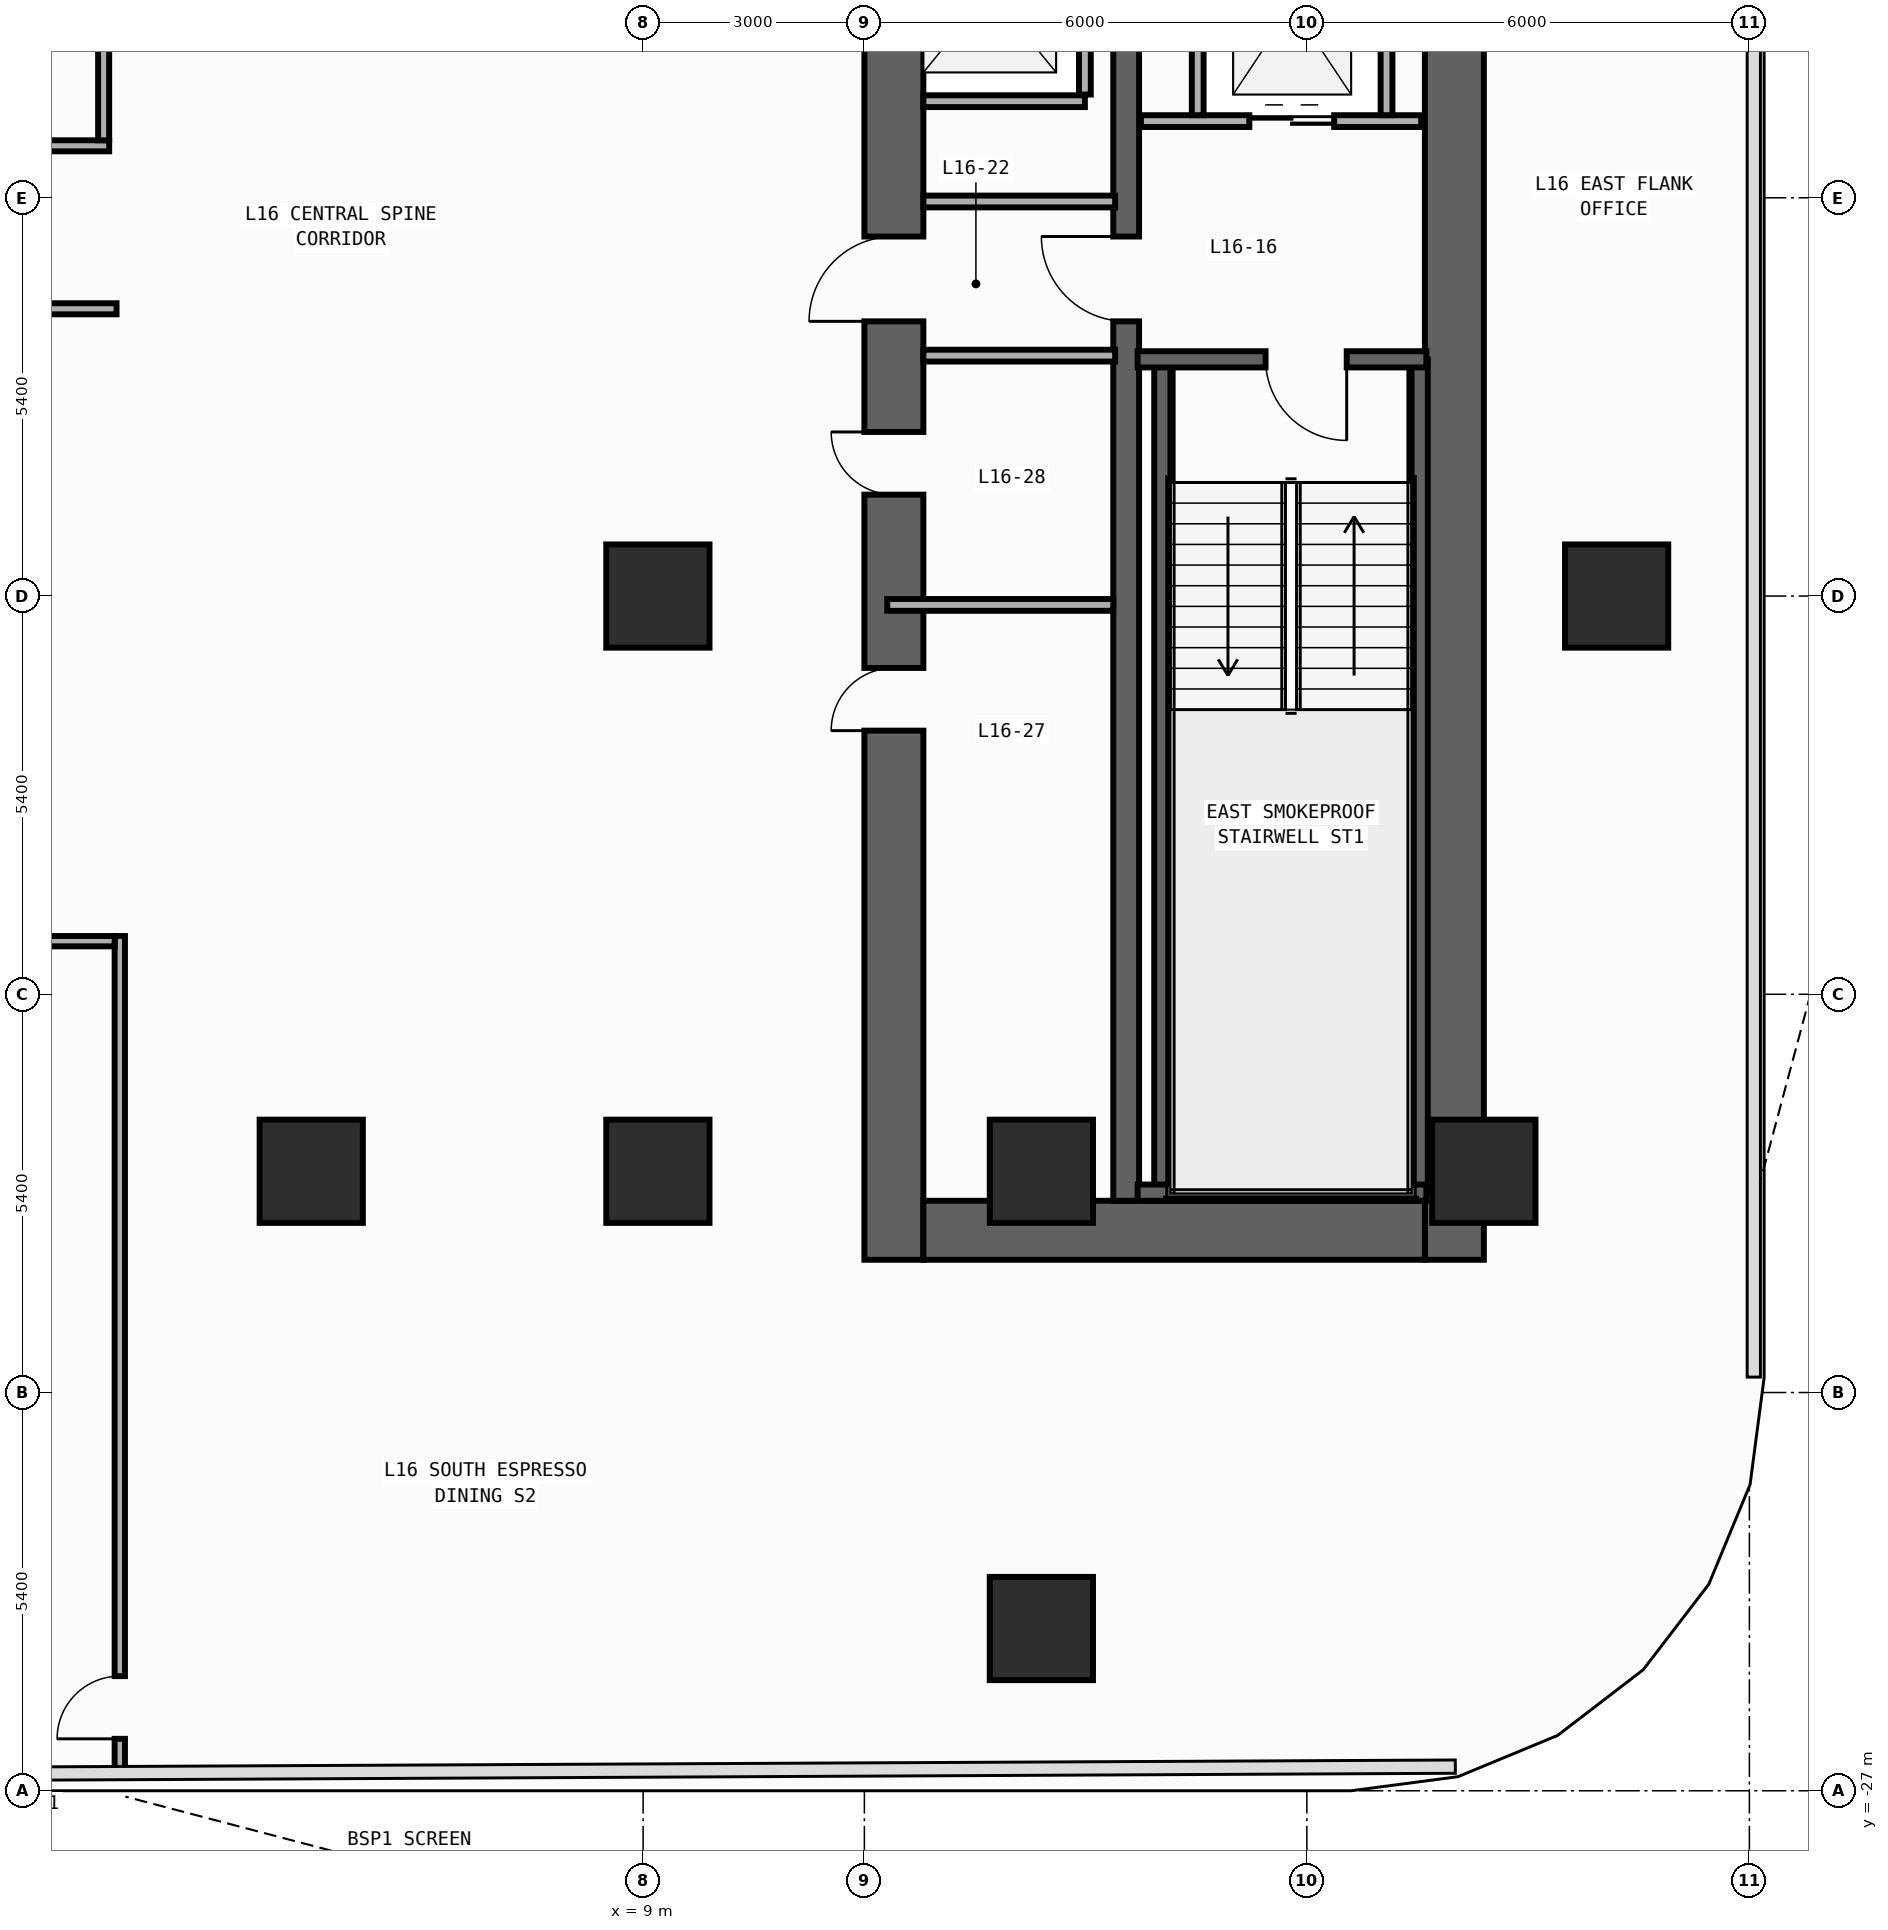
"""IFC4 building model, lengths in metres.
Left out: names, types, materials, properties, quantities, classifications, styles, units other than length and angle.
Written with IfcOpenShell. Run it as: python <this file> out.ifc"""

import sys

from ifc_helpers import new_model, si_unit, direction, frame, frame_2d, origin, origin_2d, place, context, subcontext, project, spatial, rectangle, extrude, element, fill, save


model = new_model("IFC4")
c1 = context("Model", 3, precision=1e-05, world=origin(), true_north=direction((0.0, 1.0)))
c2 = subcontext(c1, "Body", "Model", "MODEL_VIEW")
j1 = project(units=[si_unit("LENGTHUNIT", "METRE"), si_unit("PLANEANGLEUNIT", "RADIAN")], contexts=[c1])
p1 = place(None, origin())
s1 = spatial("IfcSite", under=j1, at=p1, CompositionType="ELEMENT")
p2 = place(p1, origin())
s2 = spatial("IfcBuilding", under=s1, at=p2, CompositionType="ELEMENT")
p3 = place(p2, frame((0.0, 0.0, 68.0)))
s3 = spatial("IfcBuildingStorey", under=s2, at=p3, CompositionType="ELEMENT", Elevation=68.0)
p4 = place(p3, frame((12.4, -19.8, 0.0), z_axis=(0.0, 0.0, 1.0), x_axis=(0.0, 1.0, 0.0)))
e1 = element("IfcWall", 1, at=p4, inside=s3, PredefinedType="SHEAR", context=c2, shape_type="SweptSolid", body=[
    extrude(rectangle(XDim=27.0, YDim=0.8, at=frame_2d((13.5, 0.0))), origin(), (0.0, 0.0, 1.0), 3.94),
])
p5 = place(p4, frame((23.05, 0.0, 0.0)))
e2 = element("IfcOpeningElement", 2, at=p5, cuts=e1, PredefinedType="OPENING", context=c2, shape_type="SweptSolid", body=[
    extrude(rectangle(XDim=1.1, YDim=2.2, at=frame_2d((0.55, 1.1))), frame((0.0, 0.41, 0.0), z_axis=(0.0, -1.0, 0.0), x_axis=(1.0, 0.0, 0.0)), (0.0, 0.0, 1.0), 0.82),
])
p6 = place(p4, frame((19.85, 0.0, 0.0)))
e3 = element("IfcOpeningElement", 3, at=p6, cuts=e1, PredefinedType="OPENING", context=c2, shape_type="SweptSolid", body=[
    extrude(rectangle(XDim=1.1, YDim=2.2, at=frame_2d((0.55, 1.1))), frame((0.0, 0.41, 0.0), z_axis=(0.0, -1.0, 0.0), x_axis=(1.0, 0.0, 0.0)), (0.0, 0.0, 1.0), 0.82),
])
p7 = place(p4, frame((16.65, 0.0, 0.0)))
e4 = element("IfcOpeningElement", 4, at=p7, cuts=e1, PredefinedType="OPENING", context=c2, shape_type="SweptSolid", body=[
    extrude(rectangle(XDim=1.1, YDim=2.2, at=frame_2d((0.55, 1.1))), frame((0.0, 0.41, 0.0), z_axis=(0.0, -1.0, 0.0), x_axis=(1.0, 0.0, 0.0)), (0.0, 0.0, 1.0), 0.82),
])
p8 = place(p4, frame((7.175, 0.0, 0.0)))
e5 = element("IfcOpeningElement", 5, at=p8, cuts=e1, PredefinedType="OPENING", context=c2, shape_type="SweptSolid", body=[
    extrude(rectangle(XDim=0.85, YDim=2.1, at=frame_2d((0.425, 1.05))), frame((0.0, 0.41, 0.0), z_axis=(0.0, -1.0, 0.0), x_axis=(1.0, 0.0, 0.0)), (0.0, 0.0, 1.0), 0.82),
])
p9 = place(p4, frame((10.375, 0.0, 0.0)))
e6 = element("IfcOpeningElement", 6, at=p9, cuts=e1, PredefinedType="OPENING", context=c2, shape_type="SweptSolid", body=[
    extrude(rectangle(XDim=0.85, YDim=2.1, at=frame_2d((0.425, 1.05))), frame((0.0, 0.41, 0.0), z_axis=(0.0, -1.0, 0.0), x_axis=(1.0, 0.0, 0.0)), (0.0, 0.0, 1.0), 0.82),
])
p10 = place(p4, frame((12.725, 0.0, 0.0)))
e7 = element("IfcOpeningElement", 7, at=p10, cuts=e1, PredefinedType="OPENING", context=c2, shape_type="SweptSolid", body=[
    extrude(rectangle(XDim=1.15, YDim=2.2, at=frame_2d((0.575, 1.1))), frame((0.0, 0.41, 0.0), z_axis=(0.0, -1.0, 0.0), x_axis=(1.0, 0.0, 0.0)), (0.0, 0.0, 1.0), 0.82),
])
p11 = place(p4, frame((25.125, 0.0, 0.0)))
e8 = element("IfcOpeningElement", 8, at=p11, cuts=e1, PredefinedType="OPENING", context=c2, shape_type="SweptSolid", body=[
    extrude(rectangle(XDim=0.85, YDim=2.1, at=frame_2d((0.425, 1.05))), frame((0.0, 0.41, 0.0), z_axis=(0.0, -1.0, 0.0), x_axis=(1.0, 0.0, 0.0)), (0.0, 0.0, 1.0), 0.82),
])
p12 = place(p3, frame((20.0, -19.8, 0.0), z_axis=(0.0, 0.0, 1.0), x_axis=(0.0, 1.0, 0.0)))
e9 = element("IfcWall", 9, at=p12, inside=s3, PredefinedType="SHEAR", context=c2, shape_type="SweptSolid", body=[
    extrude(rectangle(XDim=27.0, YDim=0.8, at=frame_2d((13.5, 0.0))), origin(), (0.0, 0.0, 1.0), 3.94),
])
p13 = place(p3, frame((12.8, -19.4, 0.0), z_axis=(0.0, 0.0, 1.0), x_axis=(1.0, 0.0, 0.0)))
e10 = element("IfcWall", 10, at=p13, inside=s3, PredefinedType="SHEAR", context=c2, shape_type="SweptSolid", body=[
    extrude(rectangle(XDim=6.8, YDim=0.8, at=frame_2d((3.4, 0.0))), origin(), (0.0, 0.0, 1.0), 3.94),
])
p14 = place(p3, frame((15.55, -19.0, 0.0), z_axis=(0.0, 0.0, 1.0), x_axis=(0.0, 1.0, 0.0)))
e11 = element("IfcWall", 11, at=p14, inside=s3, PredefinedType="SHEAR", context=c2, shape_type="SweptSolid", body=[
    extrude(rectangle(XDim=25.4, YDim=0.35, at=frame_2d((12.7, 0.0))), origin(), (0.0, 0.0, 1.0), 3.94),
])
p15 = place(p14, frame((11.925, 0.0, 0.0)))
e12 = element("IfcOpeningElement", 12, at=p15, cuts=e11, PredefinedType="OPENING", context=c2, shape_type="SweptSolid", body=[
    extrude(rectangle(XDim=1.15, YDim=2.2, at=frame_2d((0.575, 1.1))), frame((0.0, 0.185, 0.0), z_axis=(0.0, -1.0, 0.0), x_axis=(1.0, 0.0, 0.0)), (0.0, 0.0, 1.0), 0.37),
])
p16 = place(p14, frame((24.325, 0.0, 0.0)))
e13 = element("IfcOpeningElement", 13, at=p16, cuts=e11, PredefinedType="OPENING", context=c2, shape_type="SweptSolid", body=[
    extrude(rectangle(XDim=0.85, YDim=2.1, at=frame_2d((0.425, 1.05))), frame((0.0, 0.185, 0.0), z_axis=(0.0, -1.0, 0.0), x_axis=(1.0, 0.0, 0.0)), (0.0, 0.0, 1.0), 0.37),
])
for number, where, z_axis, x_axis in (
    (14, (16.04, -18.89, 0.0), (0.0, 0.0, 1.0), (0.0, 1.0, 0.0)),
    (15, (19.53, -18.89, 0.0), (0.0, 0.0, 1.0), (0.0, 1.0, 0.0)),
):
    element("IfcWall", number, at=place(p3, frame(where, z_axis=z_axis, x_axis=x_axis)), inside=s3, PredefinedType="SHEAR", context=c2, shape_type="SweptSolid", body=[
        extrude(rectangle(XDim=11.3, YDim=0.22, at=frame_2d((5.65, 0.0))), origin(), (0.0, 0.0, 1.0), 3.94),
    ])
p17 = place(p3, frame((15.705, -18.89, 0.0), z_axis=(0.0, 0.0, 1.0), x_axis=(1.0, 0.0, 0.0)))
e16 = element("IfcWall", 16, at=p17, inside=s3, PredefinedType="SHEAR", context=c2, shape_type="SweptSolid", body=[
    extrude(rectangle(XDim=3.915, YDim=0.22, at=frame_2d((1.958, 0.0))), origin(), (0.0, 0.0, 1.0), 3.94),
])
p18 = place(p3, frame((19.62, -7.59, 0.0), z_axis=(0.0, 0.0, 1.0), x_axis=(-1.0, 0.0, 0.0)))
e17 = element("IfcWall", 17, at=p18, inside=s3, PredefinedType="SHEAR", context=c2, shape_type="SweptSolid", body=[
    extrude(rectangle(XDim=3.915, YDim=0.22, at=frame_2d((1.958, 0.0))), origin(), (0.0, 0.0, 1.0), 3.94),
])
p19 = place(p18, frame((1.08, 0.0, 0.0)))
e18 = element("IfcOpeningElement", 18, at=p19, cuts=e17, PredefinedType="OPENING", context=c2, shape_type="SweptSolid", body=[
    extrude(rectangle(XDim=1.1, YDim=2.2, at=frame_2d((0.55, 1.1))), frame((0.0, 0.12, 0.0), z_axis=(0.0, -1.0, 0.0), x_axis=(1.0, 0.0, 0.0)), (0.0, 0.0, 1.0), 0.24),
])
for number, where, z_axis, x_axis in (
    (19, (9.2, -18.6, 0.0), (0.0, 0.0, 1.0), (1.0, 0.0, 0.0)),
    (20, (9.2, -10.8, 0.0), (0.0, 0.0, 1.0), (1.0, 0.0, 0.0)),
    (21, (20.4, -18.6, 0.0), (0.0, 0.0, 1.0), (1.0, 0.0, 0.0)),
    (22, (14.4, -18.6, 0.0), (0.0, 0.0, 1.0), (1.0, 0.0, 0.0)),
    (23, (4.5, -18.6, 0.0), (0.0, 0.0, 1.0), (1.0, 0.0, 0.0)),
    (24, (22.2, -10.8, 0.0), (0.0, 0.0, 1.0), (1.0, 0.0, 0.0)),
    (25, (14.4, -24.8, 0.0), (0.0, 0.0, 1.0), (1.0, 0.0, 0.0)),
):
    element("IfcColumn", number, at=place(p3, frame(where, z_axis=z_axis, x_axis=x_axis)), inside=s3, PredefinedType="COLUMN", context=c2, shape_type="SweptSolid", body=[
        extrude(rectangle(XDim=1.4, YDim=1.4, at=origin_2d()), origin(), (0.0, 0.0, 1.0), 4.2),
    ])
p20 = place(p3, frame((12.8, -4.09, 0.0), z_axis=(0.0, 0.0, 1.0), x_axis=(1.0, 0.0, 0.0)))
e26 = element("IfcWall", 26, at=p20, inside=s3, PredefinedType="STANDARD", context=c2, shape_type="SweptSolid", body=[
    extrude(rectangle(XDim=2.19, YDim=0.16, at=frame_2d((1.095, 0.0))), origin(), (0.0, 0.0, 1.0), 3.94),
])
p21 = place(p3, frame((14.99, -4.0, 0.0), z_axis=(0.0, 0.0, 1.0), x_axis=(0.0, 1.0, 0.0)))
e27 = element("IfcWall", 27, at=p21, inside=s3, PredefinedType="STANDARD", context=c2, shape_type="SweptSolid", body=[
    extrude(rectangle(XDim=2.8, YDim=0.16, at=frame_2d((1.4, 0.0))), origin(), (0.0, 0.0, 1.0), 3.94),
])
p22 = place(p3, frame((15.75, -4.36, 0.0), z_axis=(0.0, 0.0, 1.0), x_axis=(1.0, 0.0, 0.0)))
e28 = element("IfcWall", 28, at=p22, inside=s3, PredefinedType="STANDARD", context=c2, shape_type="SweptSolid", body=[
    extrude(rectangle(XDim=3.8, YDim=0.16, at=frame_2d((1.9, 0.0))), origin(), (0.0, 0.0, 1.0), 3.94),
])
p23 = place(p22, frame((1.47, 0.0, 0.0)))
e29 = element("IfcOpeningElement", 29, at=p23, cuts=e28, PredefinedType="OPENING", context=c2, shape_type="SweptSolid", body=[
    extrude(rectangle(XDim=1.15, YDim=2.2, at=frame_2d((0.575, 1.1))), frame((0.0, 0.09, 0.0), z_axis=(0.0, -1.0, 0.0), x_axis=(1.0, 0.0, 0.0)), (0.0, 0.0, 1.0), 0.18),
])
for number, where, z_axis, x_axis in (
    (30, (16.52, -4.28, 0.0), (0.0, 0.0, 1.0), (0.0, 1.0, 0.0)),
    (31, (19.08, -4.28, 0.0), (0.0, 0.0, 1.0), (0.0, 1.0, 0.0)),
):
    element("IfcWall", number, at=place(p3, frame(where, z_axis=z_axis, x_axis=x_axis)), inside=s3, PredefinedType="STANDARD", context=c2, shape_type="SweptSolid", body=[
        extrude(rectangle(XDim=2.98, YDim=0.16, at=frame_2d((1.49, 0.0))), origin(), (0.0, 0.0, 1.0), 3.94),
    ])
for number, where, z_axis, x_axis in (
    (32, (12.8, -5.45, 0.0), (0.0, 0.0, 1.0), (1.0, 0.0, 0.0)),
    (33, (12.8, -7.54, 0.0), (0.0, 0.0, 1.0), (1.0, 0.0, 0.0)),
):
    element("IfcWall", number, at=place(p3, frame(where, z_axis=z_axis, x_axis=x_axis)), inside=s3, PredefinedType="STANDARD", context=c2, shape_type="SweptSolid", body=[
        extrude(rectangle(XDim=2.6, YDim=0.16, at=frame_2d((1.3, 0.0))), origin(), (0.0, 0.0, 1.0), 3.94),
    ])
p24 = place(p3, frame((12.31, -10.92, 0.0), z_axis=(0.0, 0.0, 1.0), x_axis=(1.0, 0.0, 0.0)))
e34 = element("IfcWall", 34, at=p24, inside=s3, PredefinedType="PARTITIONING", context=c2, shape_type="SweptSolid", body=[
    extrude(rectangle(XDim=3.065, YDim=0.16, at=frame_2d((1.532, 0.0))), origin(), (0.0, 0.0, 1.0), 3.14),
])
p25 = place(p3, frame((-3.74, -4.695, 0.0), z_axis=(0.0, 0.0, 1.0), x_axis=(1.0, 0.0, 0.0)))
e35 = element("IfcWall", 35, at=p25, inside=s3, PredefinedType="PARTITIONING", context=c2, shape_type="SweptSolid", body=[
    extrude(rectangle(XDim=5.5, YDim=0.15, at=frame_2d((2.75, 0.0))), origin(), (0.0, 0.0, 1.0), 3.94),
])
p26 = place(p25, frame((3.322, 0.0, 0.0)))
e36 = element("IfcOpeningElement", 36, at=p26, cuts=e35, PredefinedType="OPENING", context=c2, shape_type="SweptSolid", body=[
    extrude(rectangle(XDim=0.9, YDim=2.15, at=frame_2d((0.45, 1.075))), frame((0.0, 0.085, 0.0), z_axis=(0.0, -1.0, 0.0), x_axis=(1.0, 0.0, 0.0)), (0.0, 0.0, 1.0), 0.17),
])
p27 = place(p3, frame((-6.86, -6.905, 0.0), z_axis=(0.0, 0.0, 1.0), x_axis=(1.0, 0.0, 0.0)))
e37 = element("IfcWall", 37, at=p27, inside=s3, PredefinedType="PARTITIONING", context=c2, shape_type="SweptSolid", body=[
    extrude(rectangle(XDim=8.72, YDim=0.15, at=frame_2d((4.36, 0.0))), origin(), (0.0, 0.0, 1.0), 3.94),
])
p28 = place(p27, frame((6.345, 0.0, 0.0)))
e38 = element("IfcOpeningElement", 38, at=p28, cuts=e37, PredefinedType="OPENING", context=c2, shape_type="SweptSolid", body=[
    extrude(rectangle(XDim=0.9, YDim=2.15, at=frame_2d((0.45, 1.075))), frame((0.0, 0.085, 0.0), z_axis=(0.0, -1.0, 0.0), x_axis=(1.0, 0.0, 0.0)), (0.0, 0.0, 1.0), 0.17),
])
p29 = place(p3, frame((1.685, -4.62, 0.0), z_axis=(0.0, 0.0, 1.0), x_axis=(0.0, 1.0, 0.0)))
e39 = element("IfcWall", 39, at=p29, inside=s3, PredefinedType="PARTITIONING", context=c2, shape_type="SweptSolid", body=[
    extrude(rectangle(XDim=20.005, YDim=0.15, at=frame_2d((10.002, 0.0))), origin(), (0.0, 0.0, 1.0), 3.94),
])
p30 = place(p29, frame((9.552, 0.0, 0.0)))
e40 = element("IfcOpeningElement", 40, at=p30, cuts=e39, PredefinedType="OPENING", context=c2, shape_type="SweptSolid", body=[
    extrude(rectangle(XDim=0.9, YDim=2.15, at=frame_2d((0.45, 1.075))), frame((0.0, 0.085, 0.0), z_axis=(0.0, -1.0, 0.0), x_axis=(1.0, 0.0, 0.0)), (0.0, 0.0, 1.0), 0.17),
])
p31 = place(p3, frame((1.904, -26.756, 0.0), z_axis=(0.0, 0.0, 1.0), x_axis=(0.0, 1.0, 0.0)))
e41 = element("IfcWall", 41, at=p31, inside=s3, PredefinedType="PARTITIONING", context=c2, shape_type="SweptSolid", body=[
    extrude(rectangle(XDim=11.346, YDim=0.14, at=frame_2d((5.673, 0.0))), origin(), (0.0, 0.0, 1.0), 3.94),
])
p32 = place(p31, frame((0.46, 0.0, 0.0)))
e42 = element("IfcOpeningElement", 42, at=p32, cuts=e41, PredefinedType="OPENING", context=c2, shape_type="SweptSolid", body=[
    extrude(rectangle(XDim=0.85, YDim=2.1, at=frame_2d((0.425, 1.05))), frame((0.0, 0.08, 0.0), z_axis=(0.0, -1.0, 0.0), x_axis=(1.0, 0.0, 0.0)), (0.0, 0.0, 1.0), 0.16),
])
p33 = place(p3, frame((-6.86, -15.48, 0.0), z_axis=(0.0, 0.0, 1.0), x_axis=(1.0, 0.0, 0.0)))
e43 = element("IfcWall", 43, at=p33, inside=s3, PredefinedType="PARTITIONING", context=c2, shape_type="SweptSolid", body=[
    extrude(rectangle(XDim=8.694, YDim=0.14, at=frame_2d((4.347, 0.0))), origin(), (0.0, 0.0, 1.0), 3.94),
])
p34 = place(p33, frame((4.125, 0.0, 0.0)))
e44 = element("IfcOpeningElement", 44, at=p34, cuts=e43, PredefinedType="OPENING", context=c2, shape_type="SweptSolid", body=[
    extrude(rectangle(XDim=0.85, YDim=2.1, at=frame_2d((0.425, 1.05))), frame((0.0, 0.08, 0.0), z_axis=(0.0, -1.0, 0.0), x_axis=(1.0, 0.0, 0.0)), (0.0, 0.0, 1.0), 0.16),
])
p35 = place(p19, origin())
e45 = element("IfcDoor", 45, at=p35, inside=s3, OperationType="SINGLE_SWING_LEFT", PredefinedType="DOOR", context=c2, shape_type="SweptSolid", body=[
    extrude(rectangle(XDim=1.1, YDim=2.2, at=frame_2d((0.55, 1.1))), frame((0.0, 0.025, 0.0), z_axis=(0.0, -1.0, 0.0), x_axis=(1.0, 0.0, 0.0)), (0.0, 0.0, 1.0), 0.05),
])
fill(e18, e45)
p36 = place(p8, origin())
e46 = element("IfcDoor", 46, at=p36, inside=s3, OperationType="SINGLE_SWING_LEFT", PredefinedType="DOOR", context=c2, shape_type="SweptSolid", body=[
    extrude(rectangle(XDim=0.85, YDim=2.1, at=frame_2d((0.425, 1.05))), frame((0.0, 0.025, 0.0), z_axis=(0.0, -1.0, 0.0), x_axis=(1.0, 0.0, 0.0)), (0.0, 0.0, 1.0), 0.05),
])
fill(e5, e46)
p37 = place(p9, origin())
e47 = element("IfcDoor", 47, at=p37, inside=s3, OperationType="SINGLE_SWING_RIGHT", PredefinedType="DOOR", context=c2, shape_type="SweptSolid", body=[
    extrude(rectangle(XDim=0.85, YDim=2.1, at=frame_2d((0.425, 1.05))), frame((0.0, 0.025, 0.0), z_axis=(0.0, -1.0, 0.0), x_axis=(1.0, 0.0, 0.0)), (0.0, 0.0, 1.0), 0.05),
])
fill(e6, e47)
p38 = place(p10, origin())
e48 = element("IfcDoor", 48, at=p38, inside=s3, OperationType="SINGLE_SWING_LEFT", PredefinedType="DOOR", context=c2, shape_type="SweptSolid", body=[
    extrude(rectangle(XDim=1.15, YDim=2.2, at=frame_2d((0.575, 1.1))), frame((0.0, 0.025, 0.0), z_axis=(0.0, -1.0, 0.0), x_axis=(1.0, 0.0, 0.0)), (0.0, 0.0, 1.0), 0.05),
])
fill(e7, e48)
p39 = place(p15, origin())
e49 = element("IfcDoor", 49, at=p39, inside=s3, OperationType="SINGLE_SWING_RIGHT", PredefinedType="DOOR", context=c2, shape_type="SweptSolid", body=[
    extrude(rectangle(XDim=1.15, YDim=2.2, at=frame_2d((0.575, 1.1))), frame((0.0, 0.025, 0.0), z_axis=(0.0, -1.0, 0.0), x_axis=(1.0, 0.0, 0.0)), (0.0, 0.0, 1.0), 0.05),
])
fill(e12, e49)
p40 = place(p23, origin())
e50 = element("IfcDoor", 50, at=p40, inside=s3, OperationType="DOUBLE_DOOR_SLIDING", PredefinedType="DOOR", context=c2, shape_type="SweptSolid", body=[
    extrude(rectangle(XDim=1.15, YDim=2.2, at=frame_2d((0.575, 1.1))), frame((0.0, 0.025, 0.0), z_axis=(0.0, -1.0, 0.0), x_axis=(1.0, 0.0, 0.0)), (0.0, 0.0, 1.0), 0.05),
])
fill(e29, e50)
p41 = place(p32, origin())
e51 = element("IfcDoor", 51, at=p41, inside=s3, OperationType="SINGLE_SWING_LEFT", PredefinedType="DOOR", context=c2, shape_type="SweptSolid", body=[
    extrude(rectangle(XDim=0.85, YDim=2.1, at=frame_2d((0.425, 1.05))), frame((0.0, 0.025, 0.0), z_axis=(0.0, -1.0, 0.0), x_axis=(1.0, 0.0, 0.0)), (0.0, 0.0, 1.0), 0.05),
])
fill(e42, e51)
save(model, sys.argv[1])
